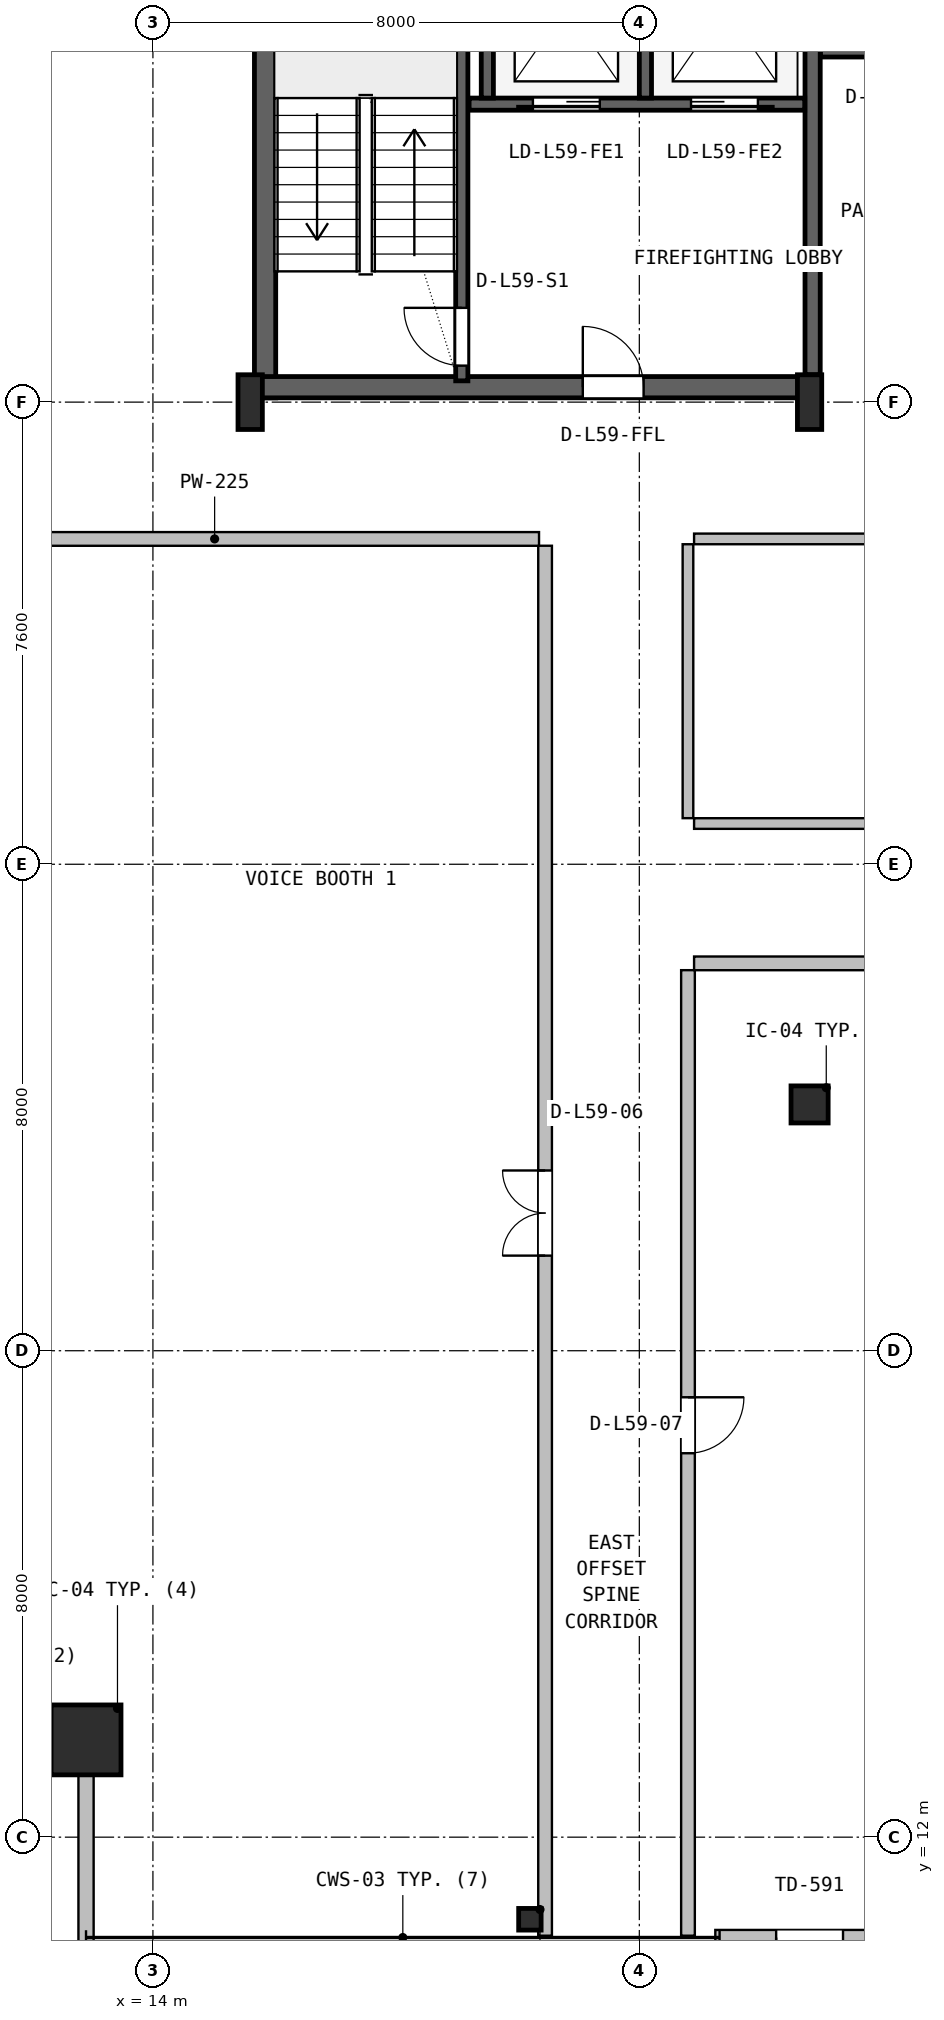
"""IFC4 building model, lengths in metres.
Left out: names, types, materials, properties, quantities, classifications, styles, units other than length and angle.
Written with IfcOpenShell. Run it as: python <this file> out.ifc"""

import sys

from ifc_helpers import new_model, si_unit, direction, frame, frame_2d, origin, origin_2d, place, context, subcontext, project, spatial, rectangle, hollow_rectangle, hollow_circle, i_section, extrude, source, transform, mapped, element, fill, save


model = new_model("IFC4")
c1 = context("Model", 3, precision=1e-05, world=origin(), true_north=direction((0.0, 1.0)))
c2 = subcontext(c1, "Body", "Model", "MODEL_VIEW")
j1 = project(units=[si_unit("LENGTHUNIT", "METRE"), si_unit("PLANEANGLEUNIT", "RADIAN")], contexts=[c1])
p1 = place(None, origin())
s1 = spatial("IfcSite", under=j1, at=p1, CompositionType="ELEMENT")
p2 = place(p1, origin())
s2 = spatial("IfcBuilding", under=s1, at=p2, CompositionType="ELEMENT")
p3 = place(p2, frame((0.0, 0.0, 239.4)))
s3 = spatial("IfcBuildingStorey", under=s2, at=p3, CompositionType="ELEMENT", Elevation=239.4)
p4 = place(p3, frame((15.845, 35.67, 0.0), z_axis=(0.0, 0.0, 1.0), x_axis=(0.0, 1.0, 0.0)))
e1 = element("IfcWall", 1, at=p4, inside=s3, PredefinedType="SHEAR", context=c2, shape_type="SweptSolid", body=[
    extrude(rectangle(XDim=11.13, YDim=0.35, at=frame_2d((5.565, 0.0))), origin(), (0.0, 0.0, 1.0), 3.55),
])
p5 = place(p3, frame((15.67, 35.845, 0.0), z_axis=(0.0, 0.0, 1.0), x_axis=(1.0, 0.0, 0.0)))
e2 = element("IfcWall", 2, at=p5, inside=s3, PredefinedType="SHEAR", context=c2, shape_type="SweptSolid", body=[
    extrude(rectangle(XDim=9.13, YDim=0.35, at=frame_2d((4.565, 0.0))), origin(), (0.0, 0.0, 1.0), 3.55),
])
p6 = place(p5, frame((5.4, 0.0, 0.0)))
e3 = element("IfcOpeningElement", 3, at=p6, cuts=e2, PredefinedType="OPENING", context=c2, shape_type="SweptSolid", body=[
    extrude(rectangle(XDim=1.0, YDim=2.1, at=frame_2d((0.5, 1.05))), frame((0.0, 0.185, 0.0), z_axis=(0.0, -1.0, 0.0), x_axis=(1.0, 0.0, 0.0)), (0.0, 0.0, 1.0), 0.37),
])
m1 = source(origin(), c2, "Body", "SweptSolid", [
    extrude(i_section(OverallWidth=0.4, OverallDepth=0.9, WebThickness=0.016, FlangeThickness=0.028, FilletRadius=0.016, at=origin_2d()), origin(), (0.0, 0.0, 1.0), 3.8),
])
for number, where, z_axis, x_axis in (
    (4, (15.6, 35.6, 0.0), (0.0, 0.0, 1.0), (1.0, 0.0, 0.0)),
    (5, (24.8, 35.6, 0.0), (0.0, 0.0, 1.0), (1.0, 0.0, 0.0)),
):
    element("IfcColumn", number, at=place(p3, frame(where, z_axis=z_axis, x_axis=x_axis)), inside=s3, PredefinedType="COLUMN", context=c2, shape_type="MappedRepresentation", body=[
        mapped(m1, transform((0.0, 0.0, 0.0), x_axis=(1.0, 0.0, 0.0), y_axis=(0.0, 1.0, 0.0), z_axis=(0.0, 0.0, 1.0), scale=1.0)),
    ])
m2 = source(origin(), c2, "Body", "SweptSolid", [
    extrude(hollow_rectangle(XDim=1.15, YDim=1.15, WallThickness=0.045, at=origin_2d()), origin(), (0.0, 0.0, 1.0), 3.8),
])
p7 = place(p3, frame((12.9, 13.6, 0.0), z_axis=(0.0, 0.0, 1.0), x_axis=(1.0, 0.0, 0.0)))
e6 = element("IfcColumn", 6, at=p7, inside=s3, PredefinedType="COLUMN", context=c2, shape_type="MappedRepresentation", body=[
    mapped(m2, transform((0.0, 0.0, 0.0), x_axis=(1.0, 0.0, 0.0), y_axis=(0.0, 1.0, 0.0), z_axis=(0.0, 0.0, 1.0), scale=1.0)),
])
m3 = source(origin(), c2, "Body", "SweptSolid", [
    extrude(i_section(OverallWidth=0.369, OverallDepth=0.356, WebThickness=0.011, FlangeThickness=0.018, FilletRadius=0.016, at=origin_2d()), origin(), (0.0, 0.0, 1.0), 3.8),
])
p8 = place(p3, frame((20.2, 10.65, 0.0), z_axis=(0.0, 0.0, 1.0), x_axis=(1.0, 0.0, 0.0)))
e7 = element("IfcColumn", 7, at=p8, inside=s3, PredefinedType="COLUMN", context=c2, shape_type="MappedRepresentation", body=[
    mapped(m3, transform((0.0, 0.0, 0.0), x_axis=(1.0, 0.0, 0.0), y_axis=(0.0, 1.0, 0.0), z_axis=(0.0, 0.0, 1.0), scale=1.0)),
])
m4 = source(origin(), c2, "Body", "SweptSolid", [
    extrude(hollow_circle(Radius=0.305, WallThickness=0.025, at=origin_2d()), origin(), (0.0, 0.0, 1.0), 3.8),
])
p9 = place(p3, frame((24.8, 24.05, 0.0), z_axis=(0.0, 0.0, 1.0), x_axis=(1.0, 0.0, 0.0)))
e8 = element("IfcColumn", 8, at=p9, inside=s3, PredefinedType="COLUMN", context=c2, shape_type="MappedRepresentation", body=[
    mapped(m4, transform((0.0, 0.0, 0.0), x_axis=(1.0, 0.0, 0.0), y_axis=(0.0, 1.0, 0.0), z_axis=(0.0, 0.0, 1.0), scale=1.0)),
])
p10 = place(p3, frame((23.25, 10.35, 0.0), z_axis=(0.0, 0.0, 1.0), x_axis=(1.0, 0.0, 0.0)))
e9 = element("IfcWall", 9, at=p10, inside=s3, PredefinedType="SOLIDWALL", context=c2, shape_type="SweptSolid", body=[
    extrude(rectangle(XDim=3.1, YDim=0.25, at=frame_2d((1.55, 0.0))), origin(), (0.0, 0.0, 1.0), 3.53),
])
p11 = place(p10, frame((1.0, 0.0, 0.0)))
e10 = element("IfcOpeningElement", 10, at=p11, cuts=e9, PredefinedType="OPENING", context=c2, shape_type="SweptSolid", body=[
    extrude(rectangle(XDim=1.1, YDim=2.15, at=frame_2d((0.55, 1.075))), frame((0.0, 0.135, 0.0), z_axis=(0.0, -1.0, 0.0), x_axis=(1.0, 0.0, 0.0)), (0.0, 0.0, 1.0), 0.27),
])
p12 = place(p3, frame((12.9, 10.28, 0.0), z_axis=(0.0, 0.0, 1.0), x_axis=(0.0, 1.0, 0.0)))
e11 = element("IfcWall", 11, at=p12, inside=s3, PredefinedType="SOLIDWALL", context=c2, shape_type="SweptSolid", body=[
    extrude(rectangle(XDim=3.4, YDim=0.25, at=frame_2d((1.7, 0.0))), origin(), (0.0, 0.0, 1.0), 3.171),
])
p13 = place(p3, frame((19.08, 35.95, 0.0), z_axis=(0.0, 0.0, 1.0), x_axis=(0.0, 1.0, 0.0)))
e12 = element("IfcWall", 12, at=p13, inside=s3, PredefinedType="SHEAR", context=c2, shape_type="SweptSolid", body=[
    extrude(rectangle(XDim=9.65, YDim=0.2, at=frame_2d((4.825, 0.0))), origin(), (0.0, 0.0, 1.0), 3.55),
])
p14 = place(p13, frame((0.25, 0.0, 0.0)))
e13 = element("IfcOpeningElement", 13, at=p14, cuts=e12, PredefinedType="OPENING", context=c2, shape_type="SweptSolid", body=[
    extrude(rectangle(XDim=0.95, YDim=2.1, at=frame_2d((0.475, 1.05))), frame((0.0, 0.11, 0.0), z_axis=(0.0, -1.0, 0.0), x_axis=(1.0, 0.0, 0.0)), (0.0, 0.0, 1.0), 0.22),
])
p15 = place(p3, frame((24.85, 36.05, 0.0), z_axis=(0.0, 0.0, 1.0), x_axis=(0.0, 1.0, 0.0)))
e14 = element("IfcWall", 14, at=p15, inside=s3, PredefinedType="SHEAR", context=c2, shape_type="SweptSolid", body=[
    extrude(rectangle(XDim=10.45, YDim=0.25, at=frame_2d((5.225, 0.0))), origin(), (0.0, 0.0, 1.0), 3.55),
])
p16 = place(p3, frame((19.2, 40.5, 0.0), z_axis=(0.0, 0.0, 1.0), x_axis=(1.0, 0.0, 0.0)))
e15 = element("IfcWall", 15, at=p16, inside=s3, PredefinedType="SHEAR", context=c2, shape_type="SweptSolid", body=[
    extrude(rectangle(XDim=5.52, YDim=0.2, at=frame_2d((2.76, 0.0))), origin(), (0.0, 0.0, 1.0), 3.55),
])
p17 = place(p16, frame((1.05, 0.0, 0.0)))
e16 = element("IfcOpeningElement", 16, at=p17, cuts=e15, PredefinedType="OPENING", context=c2, shape_type="SweptSolid", body=[
    extrude(rectangle(XDim=1.1, YDim=2.18, at=frame_2d((0.55, 1.09))), frame((0.0, 0.11, 0.0), z_axis=(0.0, -1.0, 0.0), x_axis=(1.0, 0.0, 0.0)), (0.0, 0.0, 1.0), 0.22),
])
p18 = place(p16, frame((3.65, 0.0, 0.0)))
e17 = element("IfcOpeningElement", 17, at=p18, cuts=e15, PredefinedType="OPENING", context=c2, shape_type="SweptSolid", body=[
    extrude(rectangle(XDim=1.1, YDim=2.18, at=frame_2d((0.55, 1.09))), frame((0.0, 0.11, 0.0), z_axis=(0.0, -1.0, 0.0), x_axis=(1.0, 0.0, 0.0)), (0.0, 0.0, 1.0), 0.22),
])
p19 = place(p3, frame((22.1, 40.6, 0.0), z_axis=(0.0, 0.0, 1.0), x_axis=(0.0, 1.0, 0.0)))
e18 = element("IfcWall", 18, at=p19, inside=s3, PredefinedType="SHEAR", context=c2, shape_type="SweptSolid", body=[
    extrude(rectangle(XDim=3.0, YDim=0.2, at=frame_2d((1.5, 0.0))), origin(), (0.0, 0.0, 1.0), 3.55),
])
p20 = place(p3, frame((19.5, 40.6, 0.0), z_axis=(0.0, 0.0, 1.0), x_axis=(0.0, 1.0, 0.0)))
e19 = element("IfcWall", 19, at=p20, inside=s3, PredefinedType="SHEAR", context=c2, shape_type="SweptSolid", body=[
    extrude(rectangle(XDim=5.95, YDim=0.2, at=frame_2d((2.975, 0.0))), origin(), (0.0, 0.0, 1.0), 3.55),
])
p21 = place(p3, frame((24.98, 41.4, 0.0), z_axis=(0.0, 0.0, 1.0), x_axis=(1.0, 0.0, 0.0)))
e20 = element("IfcWall", 20, at=p21, inside=s3, PredefinedType="SHEAR", context=c2, shape_type="SweptSolid", body=[
    extrude(rectangle(XDim=23.82, YDim=0.25, at=frame_2d((11.91, 0.0))), origin(), (0.0, 0.0, 1.0), 3.55),
])
p22 = place(p21, frame((16.87, 0.0, 0.0)))
e21 = element("IfcOpeningElement", 21, at=p22, cuts=e20, PredefinedType="OPENING", context=c2, shape_type="SweptSolid", body=[
    extrude(rectangle(XDim=1.1, YDim=2.18, at=frame_2d((0.55, 1.09))), frame((0.0, 0.135, 0.0), z_axis=(0.0, -1.0, 0.0), x_axis=(1.0, 0.0, 0.0)), (0.0, 0.0, 1.0), 0.27),
])
p23 = place(p21, frame((19.47, 0.0, 0.0)))
e22 = element("IfcOpeningElement", 22, at=p23, cuts=e20, PredefinedType="OPENING", context=c2, shape_type="SweptSolid", body=[
    extrude(rectangle(XDim=1.1, YDim=2.18, at=frame_2d((0.55, 1.09))), frame((0.0, 0.135, 0.0), z_axis=(0.0, -1.0, 0.0), x_axis=(1.0, 0.0, 0.0)), (0.0, 0.0, 1.0), 0.27),
])
p24 = place(p21, frame((22.07, 0.0, 0.0)))
e23 = element("IfcOpeningElement", 23, at=p24, cuts=e20, PredefinedType="OPENING", context=c2, shape_type="SweptSolid", body=[
    extrude(rectangle(XDim=1.1, YDim=2.18, at=frame_2d((0.55, 1.09))), frame((0.0, 0.135, 0.0), z_axis=(0.0, -1.0, 0.0), x_axis=(1.0, 0.0, 0.0)), (0.0, 0.0, 1.0), 0.27),
])
p25 = place(p21, frame((0.96, 0.0, 0.0)))
e24 = element("IfcOpeningElement", 24, at=p25, cuts=e20, PredefinedType="OPENING", context=c2, shape_type="SweptSolid", body=[
    extrude(rectangle(XDim=1.0, YDim=2.08, at=frame_2d((0.5, 1.04))), frame((0.0, 0.135, 0.0), z_axis=(0.0, -1.0, 0.0), x_axis=(1.0, 0.0, 0.0)), (0.0, 0.0, 1.0), 0.27),
])
p26 = place(p21, frame((3.56, 0.0, 0.0)))
e25 = element("IfcOpeningElement", 25, at=p26, cuts=e20, PredefinedType="OPENING", context=c2, shape_type="SweptSolid", body=[
    extrude(rectangle(XDim=1.0, YDim=2.08, at=frame_2d((0.5, 1.04))), frame((0.0, 0.135, 0.0), z_axis=(0.0, -1.0, 0.0), x_axis=(1.0, 0.0, 0.0)), (0.0, 0.0, 1.0), 0.27),
])
p27 = place(p21, frame((6.16, 0.0, 0.0)))
e26 = element("IfcOpeningElement", 26, at=p27, cuts=e20, PredefinedType="OPENING", context=c2, shape_type="SweptSolid", body=[
    extrude(rectangle(XDim=0.92, YDim=2.08, at=frame_2d((0.46, 1.04))), frame((0.0, 0.135, 0.0), z_axis=(0.0, -1.0, 0.0), x_axis=(1.0, 0.0, 0.0)), (0.0, 0.0, 1.0), 0.27),
])
p28 = place(p21, frame((11.56, 0.0, 0.0)))
e27 = element("IfcOpeningElement", 27, at=p28, cuts=e20, PredefinedType="OPENING", context=c2, shape_type="SweptSolid", body=[
    extrude(rectangle(XDim=1.0, YDim=2.08, at=frame_2d((0.5, 1.04))), frame((0.0, 0.135, 0.0), z_axis=(0.0, -1.0, 0.0), x_axis=(1.0, 0.0, 0.0)), (0.0, 0.0, 1.0), 0.27),
])
p29 = place(p3, frame((20.45, 10.38, 0.0), z_axis=(0.0, 0.0, 1.0), x_axis=(0.0, 1.0, 0.0)))
e28 = element("IfcWall", 28, at=p29, inside=s3, PredefinedType="PARTITIONING", context=c2, shape_type="SweptSolid", body=[
    extrude(rectangle(XDim=22.858, YDim=0.225, at=frame_2d((11.429, 0.0))), origin(), (0.0, 0.0, 1.0), 3.171),
])
p30 = place(p29, frame((11.184, 0.0, 0.0)))
e29 = element("IfcOpeningElement", 29, at=p30, cuts=e28, PredefinedType="OPENING", context=c2, shape_type="SweptSolid", body=[
    extrude(rectangle(XDim=1.4, YDim=2.12, at=frame_2d((0.7, 1.06))), frame((0.0, 0.123, 0.0), z_axis=(0.0, -1.0, 0.0), x_axis=(1.0, 0.0, 0.0)), (0.0, 0.0, 1.0), 0.245),
])
p31 = place(p3, frame((9.68, 33.35, 0.0), z_axis=(0.0, 0.0, 1.0), x_axis=(1.0, 0.0, 0.0)))
e30 = element("IfcWall", 30, at=p31, inside=s3, PredefinedType="PARTITIONING", context=c2, shape_type="SweptSolid", body=[
    extrude(rectangle(XDim=10.67, YDim=0.225, at=frame_2d((5.335, 0.0))), origin(), (0.0, 0.0, 1.0), 3.171),
])
p32 = place(p3, frame((22.9, 26.37, 0.0), z_axis=(0.0, 0.0, 1.0), x_axis=(1.0, 0.0, 0.0)))
e31 = element("IfcWall", 31, at=p32, inside=s3, PredefinedType="PARTITIONING", context=c2, shape_type="SweptSolid", body=[
    extrude(rectangle(XDim=35.42, YDim=0.225, at=frame_2d((17.71, 0.0))), origin(), (0.0, 0.0, 1.0), 2.908),
])
p33 = place(p32, frame((16.835, 0.0, 0.0)))
e32 = element("IfcOpeningElement", 32, at=p33, cuts=e31, PredefinedType="OPENING", context=c2, shape_type="SweptSolid", body=[
    extrude(rectangle(XDim=1.0, YDim=2.1, at=frame_2d((0.5, 1.05))), frame((0.0, 0.123, 0.0), z_axis=(0.0, -1.0, 0.0), x_axis=(1.0, 0.0, 0.0)), (0.0, 0.0, 1.0), 0.245),
])
p34 = place(p32, frame((26.07, 0.0, 0.0)))
e33 = element("IfcOpeningElement", 33, at=p34, cuts=e31, PredefinedType="OPENING", context=c2, shape_type="SweptSolid", body=[
    extrude(rectangle(XDim=0.88, YDim=2.06, at=frame_2d((0.44, 1.03))), frame((0.0, 0.123, 0.0), z_axis=(0.0, -1.0, 0.0), x_axis=(1.0, 0.0, 0.0)), (0.0, 0.0, 1.0), 0.245),
])
p35 = place(p3, frame((22.8, 10.38, 0.0), z_axis=(0.0, 0.0, 1.0), x_axis=(0.0, 1.0, 0.0)))
e34 = element("IfcWall", 34, at=p35, inside=s3, PredefinedType="PARTITIONING", context=c2, shape_type="SweptSolid", body=[
    extrude(rectangle(XDim=15.878, YDim=0.225, at=frame_2d((7.939, 0.0))), origin(), (0.0, 0.0, 1.0), 3.171),
])
p36 = place(p35, frame((7.934, 0.0, 0.0)))
e35 = element("IfcOpeningElement", 35, at=p36, cuts=e34, PredefinedType="OPENING", context=c2, shape_type="SweptSolid", body=[
    extrude(rectangle(XDim=0.92, YDim=2.08, at=frame_2d((0.46, 1.04))), frame((0.0, 0.123, 0.0), z_axis=(0.0, -1.0, 0.0), x_axis=(1.0, 0.0, 0.0)), (0.0, 0.0, 1.0), 0.245),
])
p37 = place(p3, frame((22.9, 28.67, 0.0), z_axis=(0.0, 0.0, 1.0), x_axis=(1.0, 0.0, 0.0)))
e36 = element("IfcWall", 36, at=p37, inside=s3, PredefinedType="PARTITIONING", context=c2, shape_type="SweptSolid", body=[
    extrude(rectangle(XDim=35.42, YDim=0.175, at=frame_2d((17.71, 0.0))), origin(), (0.0, 0.0, 1.0), 2.908),
])
p38 = place(p37, frame((9.585, 0.0, 0.0)))
e37 = element("IfcOpeningElement", 37, at=p38, cuts=e36, PredefinedType="OPENING", context=c2, shape_type="SweptSolid", body=[
    extrude(rectangle(XDim=1.05, YDim=2.1, at=frame_2d((0.525, 1.05))), frame((0.0, 0.098, 0.0), z_axis=(0.0, -1.0, 0.0), x_axis=(1.0, 0.0, 0.0)), (0.0, 0.0, 1.0), 0.195),
])
p39 = place(p37, frame((25.385, 0.0, 0.0)))
e38 = element("IfcOpeningElement", 38, at=p39, cuts=e36, PredefinedType="OPENING", context=c2, shape_type="SweptSolid", body=[
    extrude(rectangle(XDim=1.4, YDim=2.12, at=frame_2d((0.7, 1.06))), frame((0.0, 0.098, 0.0), z_axis=(0.0, -1.0, 0.0), x_axis=(1.0, 0.0, 0.0)), (0.0, 0.0, 1.0), 0.195),
])
p40 = place(p3, frame((22.9, 33.35, 0.0), z_axis=(0.0, 0.0, 1.0), x_axis=(1.0, 0.0, 0.0)))
e39 = element("IfcWall", 39, at=p40, inside=s3, PredefinedType="PARTITIONING", context=c2, shape_type="SweptSolid", body=[
    extrude(rectangle(XDim=35.42, YDim=0.175, at=frame_2d((17.71, 0.0))), origin(), (0.0, 0.0, 1.0), 2.908),
])
p41 = place(p3, frame((22.8, 28.758, 0.0), z_axis=(0.0, 0.0, 1.0), x_axis=(0.0, 1.0, 0.0)))
e40 = element("IfcWall", 40, at=p41, inside=s3, PredefinedType="PARTITIONING", context=c2, shape_type="SweptSolid", body=[
    extrude(rectangle(XDim=4.505, YDim=0.175, at=frame_2d((2.252, 0.0))), origin(), (0.0, 0.0, 1.0), 3.53),
])
m5 = source(origin(), c2, "Body", "SweptSolid", [
    extrude(rectangle(XDim=1.1, YDim=2.15, at=frame_2d((0.55, 1.075))), frame((0.0, 0.025, 0.0), z_axis=(0.0, -1.0, 0.0), x_axis=(1.0, 0.0, 0.0)), (0.0, 0.0, 1.0), 0.05),
])
p42 = place(p11, frame((1.1, 0.0, 0.0), z_axis=(0.0, 0.0, 1.0), x_axis=(-1.0, 0.0, 0.0)))
e41 = element("IfcDoor", 41, at=p42, inside=s3, OperationType="SINGLE_SWING_LEFT", PredefinedType="DOOR", context=c2, shape_type="MappedRepresentation", body=[
    mapped(m5, transform((0.0, 0.0, 0.0), x_axis=(1.0, 0.0, 0.0), y_axis=(0.0, 1.0, 0.0), z_axis=(0.0, 0.0, 1.0), scale=1.0)),
])
fill(e10, e41)
m6 = source(origin(), c2, "Body", "SweptSolid", [
    extrude(rectangle(XDim=0.95, YDim=2.1, at=frame_2d((0.475, 1.05))), frame((0.0, 0.025, 0.0), z_axis=(0.0, -1.0, 0.0), x_axis=(1.0, 0.0, 0.0)), (0.0, 0.0, 1.0), 0.05),
])
p43 = place(p14, origin())
e42 = element("IfcDoor", 42, at=p43, inside=s3, OperationType="SINGLE_SWING_RIGHT", PredefinedType="DOOR", context=c2, shape_type="MappedRepresentation", body=[
    mapped(m6, transform((0.0, 0.0, 0.0), x_axis=(1.0, 0.0, 0.0), y_axis=(0.0, 1.0, 0.0), z_axis=(0.0, 0.0, 1.0), scale=1.0)),
])
fill(e13, e42)
m7 = source(origin(), c2, "Body", "SweptSolid", [
    extrude(rectangle(XDim=1.0, YDim=2.1, at=frame_2d((0.5, 1.05))), frame((0.0, 0.025, 0.0), z_axis=(0.0, -1.0, 0.0), x_axis=(1.0, 0.0, 0.0)), (0.0, 0.0, 1.0), 0.05),
])
p44 = place(p6, origin())
e43 = element("IfcDoor", 43, at=p44, inside=s3, OperationType="SINGLE_SWING_LEFT", PredefinedType="DOOR", context=c2, shape_type="MappedRepresentation", body=[
    mapped(m7, transform((0.0, 0.0, 0.0), x_axis=(1.0, 0.0, 0.0), y_axis=(0.0, 1.0, 0.0), z_axis=(0.0, 0.0, 1.0), scale=1.0)),
])
fill(e3, e43)
m8 = source(origin(), c2, "Body", "SweptSolid", [
    extrude(rectangle(XDim=1.1, YDim=2.18, at=frame_2d((0.55, 1.09))), frame((0.0, 0.025, 0.0), z_axis=(0.0, -1.0, 0.0), x_axis=(1.0, 0.0, 0.0)), (0.0, 0.0, 1.0), 0.05),
])
p45 = place(p17, frame((1.1, 0.0, 0.0), z_axis=(0.0, 0.0, 1.0), x_axis=(-1.0, 0.0, 0.0)))
e44 = element("IfcDoor", 44, at=p45, inside=s3, OperationType="SLIDING_TO_LEFT", PredefinedType="DOOR", context=c2, shape_type="MappedRepresentation", body=[
    mapped(m8, transform((0.0, 0.0, 0.0), x_axis=(1.0, 0.0, 0.0), y_axis=(0.0, 1.0, 0.0), z_axis=(0.0, 0.0, 1.0), scale=1.0)),
])
fill(e16, e44)
p46 = place(p18, frame((1.1, 0.0, 0.0), z_axis=(0.0, 0.0, 1.0), x_axis=(-1.0, 0.0, 0.0)))
e45 = element("IfcDoor", 45, at=p46, inside=s3, OperationType="SLIDING_TO_RIGHT", PredefinedType="DOOR", context=c2, shape_type="MappedRepresentation", body=[
    mapped(m8, transform((0.0, 0.0, 0.0), x_axis=(1.0, 0.0, 0.0), y_axis=(0.0, 1.0, 0.0), z_axis=(0.0, 0.0, 1.0), scale=1.0)),
])
fill(e17, e45)
m9 = source(origin(), c2, "Body", "SweptSolid", [
    extrude(rectangle(XDim=1.4, YDim=2.12, at=frame_2d((0.7, 1.06))), frame((0.0, 0.025, 0.0), z_axis=(0.0, -1.0, 0.0), x_axis=(1.0, 0.0, 0.0)), (0.0, 0.0, 1.0), 0.05),
])
p47 = place(p30, origin())
e46 = element("IfcDoor", 46, at=p47, inside=s3, OperationType="DOUBLE_DOOR_SINGLE_SWING", PredefinedType="DOOR", context=c2, shape_type="MappedRepresentation", body=[
    mapped(m9, transform((0.0, 0.0, 0.0), x_axis=(1.0, 0.0, 0.0), y_axis=(0.0, 1.0, 0.0), z_axis=(0.0, 0.0, 1.0), scale=1.0)),
])
fill(e29, e46)
m10 = source(origin(), c2, "Body", "SweptSolid", [
    extrude(rectangle(XDim=0.92, YDim=2.08, at=frame_2d((0.46, 1.04))), frame((0.0, 0.025, 0.0), z_axis=(0.0, -1.0, 0.0), x_axis=(1.0, 0.0, 0.0)), (0.0, 0.0, 1.0), 0.05),
])
p48 = place(p36, frame((0.92, 0.0, 0.0), z_axis=(0.0, 0.0, 1.0), x_axis=(-1.0, 0.0, 0.0)))
e47 = element("IfcDoor", 47, at=p48, inside=s3, OperationType="SINGLE_SWING_RIGHT", PredefinedType="DOOR", context=c2, shape_type="MappedRepresentation", body=[
    mapped(m10, transform((0.0, 0.0, 0.0), x_axis=(1.0, 0.0, 0.0), y_axis=(0.0, 1.0, 0.0), z_axis=(0.0, 0.0, 1.0), scale=1.0)),
])
fill(e35, e47)
save(model, sys.argv[1])
